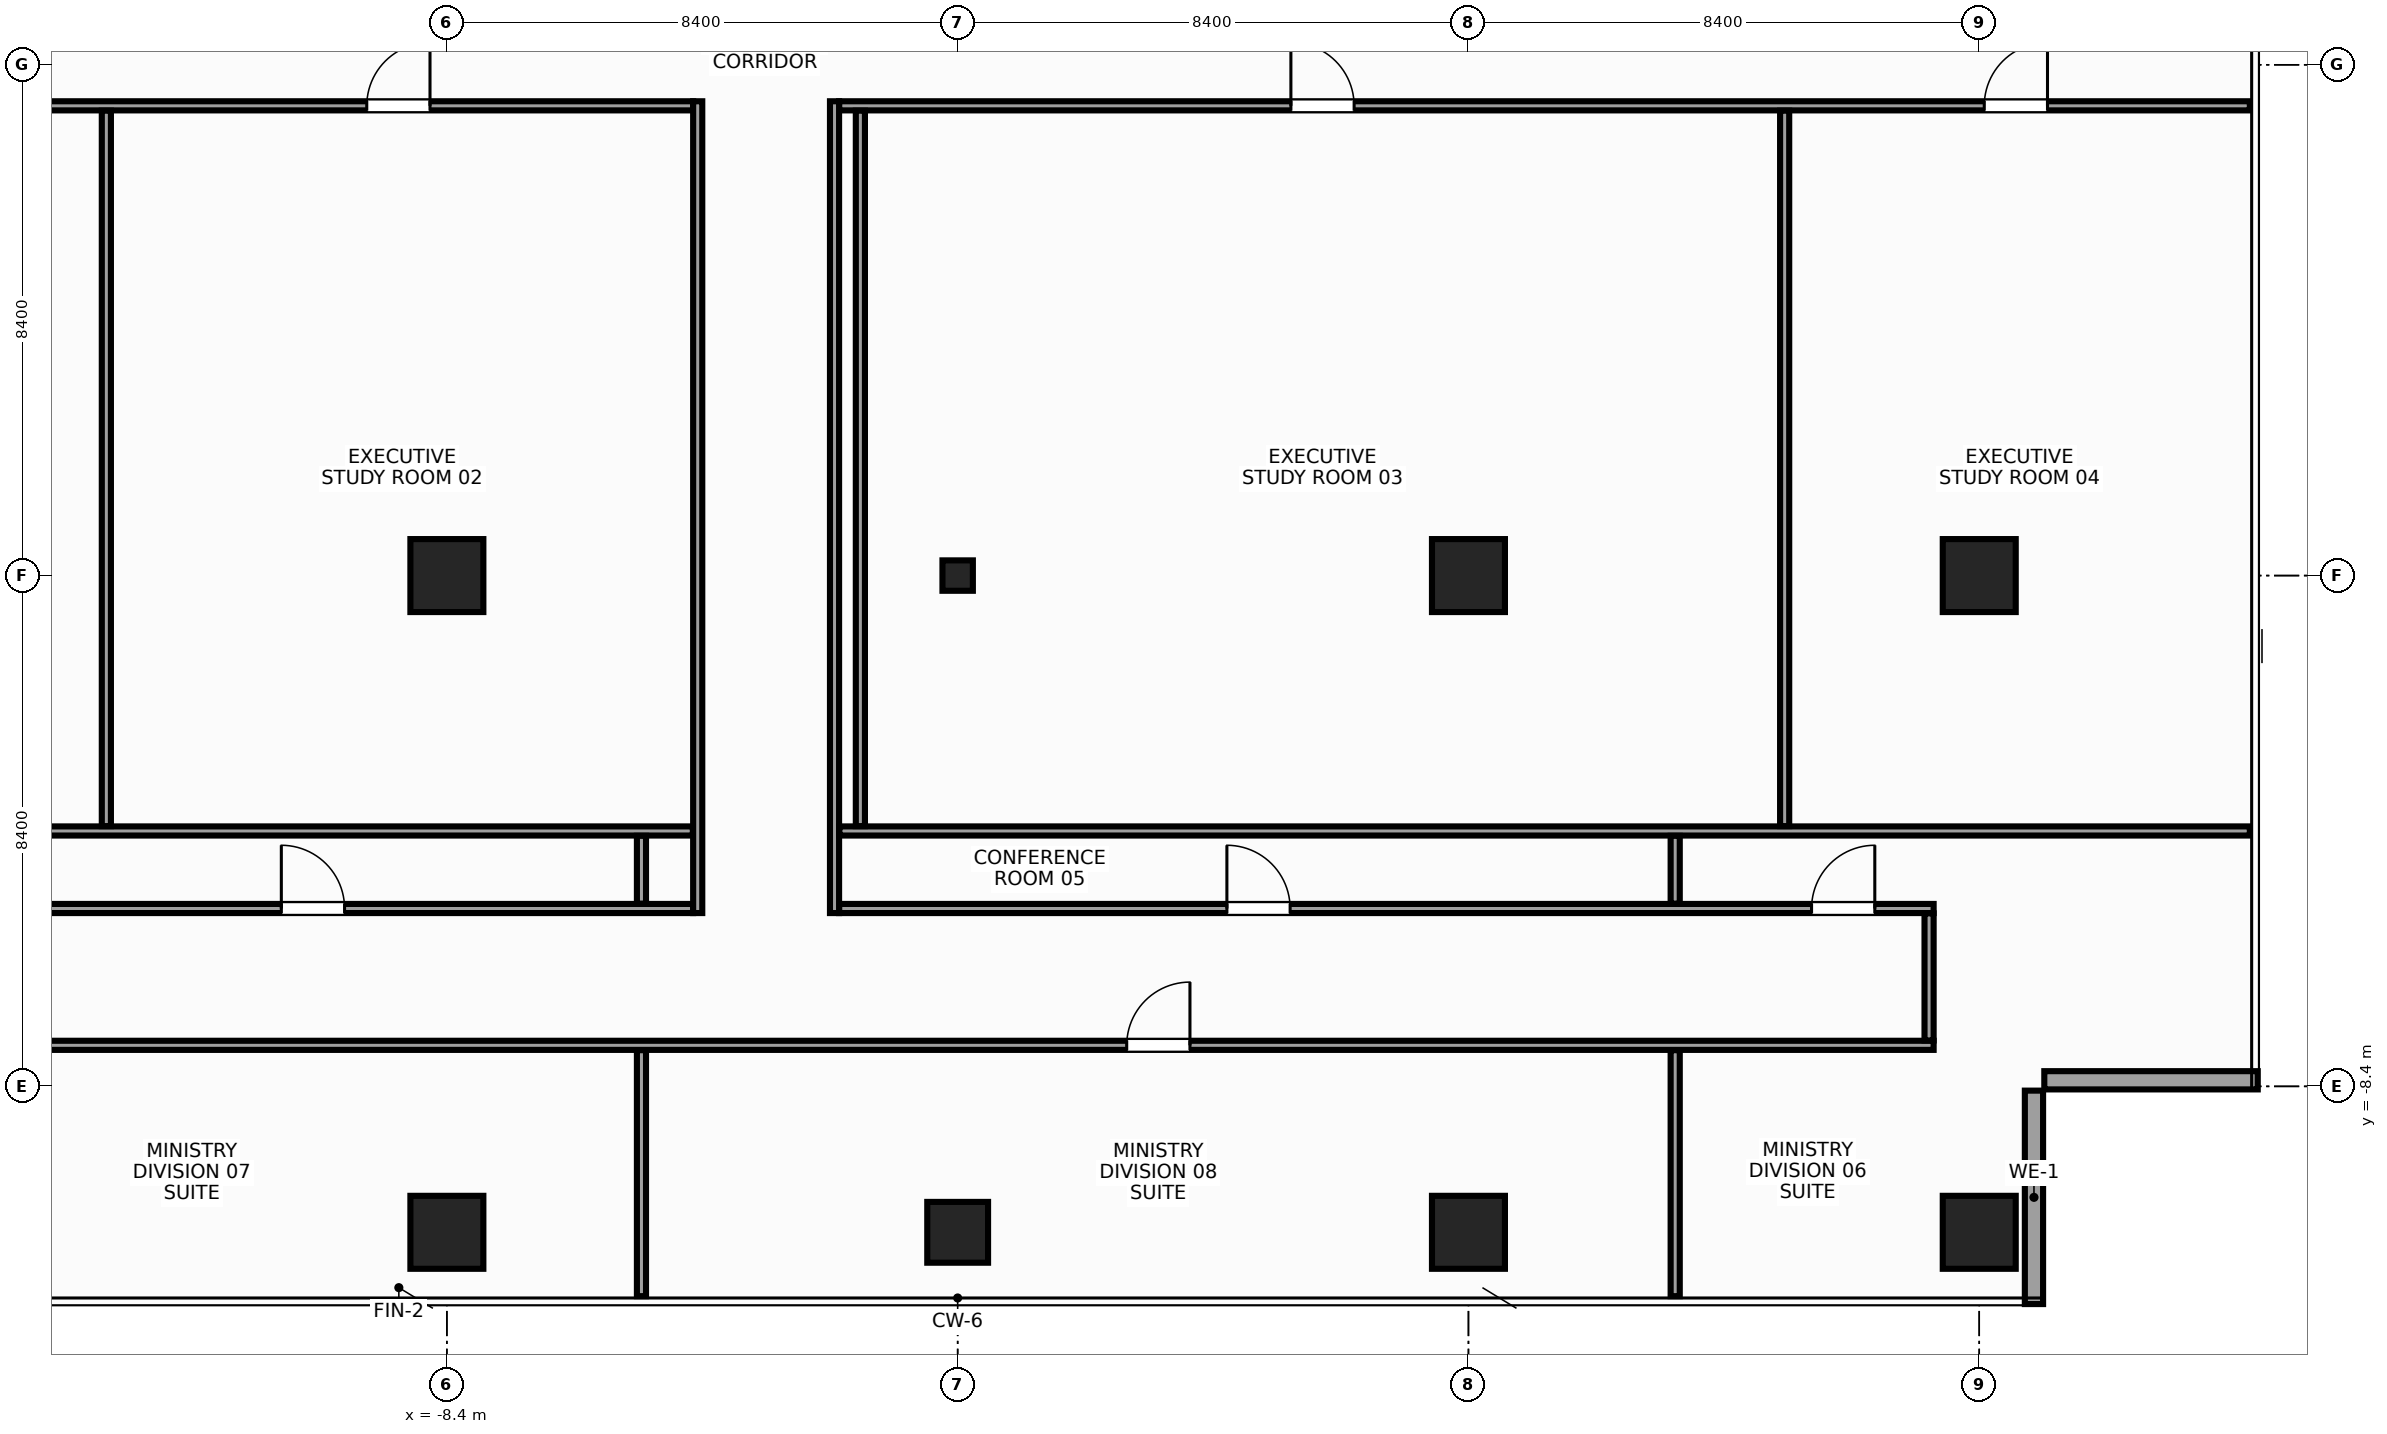
"""IFC4 building model, lengths in metres.
Left out: names, types, materials, properties, quantities, classifications, styles, units other than length and angle.
Written with IfcOpenShell. Run it as: python <this file> out.ifc"""

import sys

from ifc_helpers import new_model, si_unit, direction, frame, frame_2d, origin, origin_with_axes, origin_2d, place, context, subcontext, project, spatial, rectangle, hollow_rectangle, extrude, source, transform, mapped, element, fill, save


model = new_model("IFC4")
c1 = context("Model", 3, precision=1e-05, world=origin(), true_north=direction((0.0, 1.0)))
c2 = subcontext(c1, "Body", "Model", "MODEL_VIEW")
j1 = project(units=[si_unit("LENGTHUNIT", "METRE"), si_unit("PLANEANGLEUNIT", "RADIAN")], contexts=[c1])
p1 = place(None, origin())
s1 = spatial("IfcSite", under=j1, at=p1, CompositionType="ELEMENT")
p2 = place(p1, origin())
s2 = spatial("IfcBuilding", under=s1, at=p2, CompositionType="ELEMENT")
p3 = place(p2, frame((0.0, 0.0, 279.2)))
s3 = spatial("IfcBuildingStorey", under=s2, at=p3, CompositionType="ELEMENT", Elevation=279.2)
m1 = source(origin(), c2, "Body", "SweptSolid", [
    extrude(rectangle(XDim=1.2, YDim=1.2, at=origin_2d()), origin(), (0.0, 0.0, 1.0), 3.6),
])
for number, where, z_axis, x_axis in (
    (1, (16.8, -10.8, 0.0), (0.0, 0.0, 1.0), (1.0, 0.0, 0.0)),
    (2, (16.8, 0.0, 0.0), (0.0, 0.0, 1.0), (1.0, 0.0, 0.0)),
    (3, (-8.4, 0.0, 0.0), (0.0, 0.0, 1.0), (1.0, 0.0, 0.0)),
    (4, (-8.4, -10.8, 0.0), (0.0, 0.0, 1.0), (1.0, 0.0, 0.0)),
    (5, (8.4, 0.0, 0.0), (0.0, 0.0, 1.0), (1.0, 0.0, 0.0)),
    (6, (8.4, -10.8, 0.0), (0.0, 0.0, 1.0), (1.0, 0.0, 0.0)),
):
    element("IfcColumn", number, at=place(p3, frame(where, z_axis=z_axis, x_axis=x_axis)), inside=s3, PredefinedType="COLUMN", context=c2, shape_type="MappedRepresentation", body=[
        mapped(m1, transform((0.0, 0.0, 0.0), x_axis=(1.0, 0.0, 0.0), y_axis=(0.0, 1.0, 0.0), z_axis=(0.0, 0.0, 1.0), scale=1.0)),
    ])
m2 = source(origin(), c2, "Body", "SweptSolid", [
    extrude(rectangle(XDim=1.0, YDim=1.0, at=origin_2d()), origin(), (0.0, 0.0, 1.0), 3.6),
])
p4 = place(p3, frame((0.0, -10.8, 0.0), z_axis=(0.0, 0.0, 1.0), x_axis=(1.0, 0.0, 0.0)))
e7 = element("IfcColumn", 7, at=p4, inside=s3, PredefinedType="COLUMN", context=c2, shape_type="MappedRepresentation", body=[
    mapped(m2, transform((0.0, 0.0, 0.0), x_axis=(1.0, 0.0, 0.0), y_axis=(0.0, 1.0, 0.0), z_axis=(0.0, 0.0, 1.0), scale=1.0)),
])
m3 = source(origin(), c2, "Body", "SweptSolid", [
    extrude(hollow_rectangle(XDim=0.5, YDim=0.5, WallThickness=0.025, at=origin_2d()), origin(), (0.0, 0.0, 1.0), 3.6),
])
p5 = place(p3, origin_with_axes())
e8 = element("IfcColumn", 8, at=p5, inside=s3, PredefinedType="COLUMN", context=c2, shape_type="MappedRepresentation", body=[
    mapped(m3, transform((0.0, 0.0, 0.0), x_axis=(1.0, 0.0, 0.0), y_axis=(0.0, 1.0, 0.0), z_axis=(0.0, 0.0, 1.0), scale=1.0)),
])
m4 = source(origin(), c2, "Body", "SweptSolid", [
    extrude(rectangle(XDim=3.51, YDim=0.3, at=frame_2d((1.755, 0.0))), origin(), (0.0, 0.0, 1.0), 2.75),
])
p6 = place(p3, frame((17.7, -11.98, 0.0), z_axis=(0.0, 0.0, 1.0), x_axis=(0.0, 1.0, 0.0)))
e9 = element("IfcWall", 9, at=p6, inside=s3, PredefinedType="STANDARD", context=c2, shape_type="MappedRepresentation", body=[
    mapped(m4, transform((0.0, 0.0, 0.0), x_axis=(1.0, 0.0, 0.0), y_axis=(0.0, 1.0, 0.0), z_axis=(0.0, 0.0, 1.0), scale=1.0)),
])
m5 = source(origin(), c2, "Body", "SweptSolid", [
    extrude(rectangle(XDim=3.51, YDim=0.3, at=frame_2d((1.755, 0.0))), origin(), (0.0, 0.0, 1.0), 2.75),
])
p7 = place(p3, frame((17.87, -8.3, 0.0), z_axis=(0.0, 0.0, 1.0), x_axis=(1.0, 0.0, 0.0)))
e10 = element("IfcWall", 10, at=p7, inside=s3, PredefinedType="STANDARD", context=c2, shape_type="MappedRepresentation", body=[
    mapped(m5, transform((0.0, 0.0, 0.0), x_axis=(1.0, 0.0, 0.0), y_axis=(0.0, 1.0, 0.0), z_axis=(0.0, 0.0, 1.0), scale=1.0)),
])
m6 = source(origin(), c2, "Body", "SweptSolid", [
    extrude(rectangle(XDim=16.9, YDim=0.15, at=frame_2d((8.45, 0.0))), origin(), (0.0, 0.0, 1.0), 2.755),
])
p8 = place(p3, frame((-21.25, 7.725, 0.0), z_axis=(0.0, 0.0, 1.0), x_axis=(1.0, 0.0, 0.0)))
e11 = element("IfcWall", 11, at=p8, inside=s3, PredefinedType="PARTITIONING", context=c2, shape_type="MappedRepresentation", body=[
    mapped(m6, transform((0.0, 0.0, 0.0), x_axis=(1.0, 0.0, 0.0), y_axis=(0.0, 1.0, 0.0), z_axis=(0.0, 0.0, 1.0), scale=1.0)),
])
p9 = place(p8, frame((3.127, 0.0, 0.0)))
e12 = element("IfcOpeningElement", 12, at=p9, cuts=e11, PredefinedType="OPENING", context=c2, shape_type="SweptSolid", body=[
    extrude(rectangle(XDim=1.04, YDim=2.2, at=frame_2d((0.52, 1.1))), frame((0.0, 0.087, 0.0), z_axis=(0.0, -1.0, 0.0), x_axis=(1.0, 0.0, 0.0)), (0.0, 0.0, 1.0), 0.174),
])
p10 = place(p8, frame((11.532, 0.0, 0.0)))
e13 = element("IfcOpeningElement", 13, at=p10, cuts=e11, PredefinedType="OPENING", context=c2, shape_type="SweptSolid", body=[
    extrude(rectangle(XDim=1.04, YDim=2.2, at=frame_2d((0.52, 1.1))), frame((0.0, 0.087, 0.0), z_axis=(0.0, -1.0, 0.0), x_axis=(1.0, 0.0, 0.0)), (0.0, 0.0, 1.0), 0.174),
])
m7 = source(origin(), c2, "Body", "SweptSolid", [
    extrude(rectangle(XDim=23.2, YDim=0.15, at=frame_2d((11.6, 0.0))), origin(), (0.0, 0.0, 1.0), 2.755),
])
p11 = place(p3, frame((-1.95, 7.725, 0.0), z_axis=(0.0, 0.0, 1.0), x_axis=(1.0, 0.0, 0.0)))
e14 = element("IfcWall", 14, at=p11, inside=s3, PredefinedType="PARTITIONING", context=c2, shape_type="MappedRepresentation", body=[
    mapped(m7, transform((0.0, 0.0, 0.0), x_axis=(1.0, 0.0, 0.0), y_axis=(0.0, 1.0, 0.0), z_axis=(0.0, 0.0, 1.0), scale=1.0)),
])
p12 = place(p11, frame((7.43, 0.0, 0.0)))
e15 = element("IfcOpeningElement", 15, at=p12, cuts=e14, PredefinedType="OPENING", context=c2, shape_type="SweptSolid", body=[
    extrude(rectangle(XDim=1.04, YDim=2.2, at=frame_2d((0.52, 1.1))), frame((0.0, 0.087, 0.0), z_axis=(0.0, -1.0, 0.0), x_axis=(1.0, 0.0, 0.0)), (0.0, 0.0, 1.0), 0.174),
])
p13 = place(p11, frame((18.833, 0.0, 0.0)))
e16 = element("IfcOpeningElement", 16, at=p13, cuts=e14, PredefinedType="OPENING", context=c2, shape_type="SweptSolid", body=[
    extrude(rectangle(XDim=1.04, YDim=2.2, at=frame_2d((0.52, 1.1))), frame((0.0, 0.087, 0.0), z_axis=(0.0, -1.0, 0.0), x_axis=(1.0, 0.0, 0.0)), (0.0, 0.0, 1.0), 0.174),
])
m8 = source(origin(), c2, "Body", "SweptSolid", [
    extrude(rectangle(XDim=11.7, YDim=0.15, at=frame_2d((5.85, 0.0))), origin(), (0.0, 0.0, 1.0), 2.755),
])
p14 = place(p3, frame((-16.05, -5.475, 0.0), z_axis=(0.0, 0.0, 1.0), x_axis=(1.0, 0.0, 0.0)))
e17 = element("IfcWall", 17, at=p14, inside=s3, PredefinedType="PARTITIONING", context=c2, shape_type="MappedRepresentation", body=[
    mapped(m8, transform((0.0, 0.0, 0.0), x_axis=(1.0, 0.0, 0.0), y_axis=(0.0, 1.0, 0.0), z_axis=(0.0, 0.0, 1.0), scale=1.0)),
])
p15 = place(p14, frame((4.927, 0.0, 0.0)))
e18 = element("IfcOpeningElement", 18, at=p15, cuts=e17, PredefinedType="OPENING", context=c2, shape_type="SweptSolid", body=[
    extrude(rectangle(XDim=1.04, YDim=2.2, at=frame_2d((0.52, 1.1))), frame((0.0, 0.087, 0.0), z_axis=(0.0, -1.0, 0.0), x_axis=(1.0, 0.0, 0.0)), (0.0, 0.0, 1.0), 0.174),
])
m9 = source(origin(), c2, "Body", "SweptSolid", [
    extrude(rectangle(XDim=18.0, YDim=0.15, at=frame_2d((9.0, 0.0))), origin(), (0.0, 0.0, 1.0), 2.755),
])
p16 = place(p3, frame((-1.95, -5.475, 0.0), z_axis=(0.0, 0.0, 1.0), x_axis=(1.0, 0.0, 0.0)))
e19 = element("IfcWall", 19, at=p16, inside=s3, PredefinedType="PARTITIONING", context=c2, shape_type="MappedRepresentation", body=[
    mapped(m9, transform((0.0, 0.0, 0.0), x_axis=(1.0, 0.0, 0.0), y_axis=(0.0, 1.0, 0.0), z_axis=(0.0, 0.0, 1.0), scale=1.0)),
])
p17 = place(p16, frame((6.377, 0.0, 0.0)))
e20 = element("IfcOpeningElement", 20, at=p17, cuts=e19, PredefinedType="OPENING", context=c2, shape_type="SweptSolid", body=[
    extrude(rectangle(XDim=1.04, YDim=2.2, at=frame_2d((0.52, 1.1))), frame((0.0, 0.087, 0.0), z_axis=(0.0, -1.0, 0.0), x_axis=(1.0, 0.0, 0.0)), (0.0, 0.0, 1.0), 0.174),
])
p18 = place(p16, frame((15.992, 0.0, 0.0)))
e21 = element("IfcOpeningElement", 21, at=p18, cuts=e19, PredefinedType="OPENING", context=c2, shape_type="SweptSolid", body=[
    extrude(rectangle(XDim=1.04, YDim=2.2, at=frame_2d((0.52, 1.1))), frame((0.0, 0.087, 0.0), z_axis=(0.0, -1.0, 0.0), x_axis=(1.0, 0.0, 0.0)), (0.0, 0.0, 1.0), 0.174),
])
m10 = source(origin(), c2, "Body", "SweptSolid", [
    extrude(rectangle(XDim=32.1, YDim=0.15, at=frame_2d((16.05, 0.0))), origin(), (0.0, 0.0, 1.0), 2.755),
])
p19 = place(p3, frame((-16.05, -7.725, 0.0), z_axis=(0.0, 0.0, 1.0), x_axis=(1.0, 0.0, 0.0)))
e22 = element("IfcWall", 22, at=p19, inside=s3, PredefinedType="PARTITIONING", context=c2, shape_type="MappedRepresentation", body=[
    mapped(m10, transform((0.0, 0.0, 0.0), x_axis=(1.0, 0.0, 0.0), y_axis=(0.0, 1.0, 0.0), z_axis=(0.0, 0.0, 1.0), scale=1.0)),
])
p20 = place(p19, frame((18.83, 0.0, 0.0)))
e23 = element("IfcOpeningElement", 23, at=p20, cuts=e22, PredefinedType="OPENING", context=c2, shape_type="SweptSolid", body=[
    extrude(rectangle(XDim=1.04, YDim=2.2, at=frame_2d((0.52, 1.1))), frame((0.0, 0.087, 0.0), z_axis=(0.0, -1.0, 0.0), x_axis=(1.0, 0.0, 0.0)), (0.0, 0.0, 1.0), 0.174),
])
m11 = source(origin(), c2, "Body", "SweptSolid", [
    extrude(rectangle(XDim=13.35, YDim=0.15, at=frame_2d((6.675, 0.0))), origin(), (0.0, 0.0, 1.0), 2.655),
])
for number, where, z_axis, x_axis in (
    (24, (-4.275, -5.55, 0.0), (0.0, 0.0, 1.0), (0.0, 1.0, 0.0)),
    (25, (-2.025, -5.55, 0.0), (0.0, 0.0, 1.0), (0.0, 1.0, 0.0)),
):
    element("IfcWall", number, at=place(p3, frame(where, z_axis=z_axis, x_axis=x_axis)), inside=s3, PredefinedType="PARTITIONING", context=c2, shape_type="MappedRepresentation", body=[
        mapped(m11, transform((0.0, 0.0, 0.0), x_axis=(1.0, 0.0, 0.0), y_axis=(0.0, 1.0, 0.0), z_axis=(0.0, 0.0, 1.0), scale=1.0)),
    ])
m12 = source(origin(), c2, "Body", "SweptSolid", [
    extrude(rectangle(XDim=2.09, YDim=0.15, at=frame_2d((1.045, 0.0))), origin(), (0.0, 0.0, 1.0), 3.37),
])
p21 = place(p3, frame((15.975, -7.645, 0.0), z_axis=(0.0, 0.0, 1.0), x_axis=(0.0, 1.0, 0.0)))
e26 = element("IfcWall", 26, at=p21, inside=s3, PredefinedType="PARTITIONING", context=c2, shape_type="MappedRepresentation", body=[
    mapped(m12, transform((0.0, 0.0, 0.0), x_axis=(1.0, 0.0, 0.0), y_axis=(0.0, 1.0, 0.0), z_axis=(0.0, 0.0, 1.0), scale=1.0)),
])
m13 = source(origin(), c2, "Body", "SweptSolid", [
    extrude(rectangle(XDim=16.895, YDim=0.15, at=frame_2d((8.448, 0.0))), origin(), (0.0, 0.0, 1.0), 2.755),
])
p22 = place(p3, frame((-21.25, -4.2, 0.0), z_axis=(0.0, 0.0, 1.0), x_axis=(1.0, 0.0, 0.0)))
e27 = element("IfcWall", 27, at=p22, inside=s3, PredefinedType="PARTITIONING", context=c2, shape_type="MappedRepresentation", body=[
    mapped(m13, transform((0.0, 0.0, 0.0), x_axis=(1.0, 0.0, 0.0), y_axis=(0.0, 1.0, 0.0), z_axis=(0.0, 0.0, 1.0), scale=1.0)),
])
m14 = source(origin(), c2, "Body", "SweptSolid", [
    extrude(rectangle(XDim=23.195, YDim=0.15, at=frame_2d((11.598, 0.0))), origin(), (0.0, 0.0, 1.0), 2.755),
])
p23 = place(p3, frame((-1.945, -4.2, 0.0), z_axis=(0.0, 0.0, 1.0), x_axis=(1.0, 0.0, 0.0)))
e28 = element("IfcWall", 28, at=p23, inside=s3, PredefinedType="PARTITIONING", context=c2, shape_type="MappedRepresentation", body=[
    mapped(m14, transform((0.0, 0.0, 0.0), x_axis=(1.0, 0.0, 0.0), y_axis=(0.0, 1.0, 0.0), z_axis=(0.0, 0.0, 1.0), scale=1.0)),
])
m15 = source(origin(), c2, "Body", "SweptSolid", [
    extrude(rectangle(XDim=11.765, YDim=0.15, at=frame_2d((5.883, 0.0))), origin(), (0.0, 0.0, 1.0), 2.655),
])
for number, where, z_axis, x_axis in (
    (29, (-14.0, -4.12, 0.0), (0.0, 0.0, 1.0), (0.0, 1.0, 0.0)),
    (30, (-1.6, -4.12, 0.0), (0.0, 0.0, 1.0), (0.0, 1.0, 0.0)),
    (31, (13.6, -4.12, 0.0), (0.0, 0.0, 1.0), (0.0, 1.0, 0.0)),
):
    element("IfcWall", number, at=place(p3, frame(where, z_axis=z_axis, x_axis=x_axis)), inside=s3, PredefinedType="PARTITIONING", context=c2, shape_type="MappedRepresentation", body=[
        mapped(m15, transform((0.0, 0.0, 0.0), x_axis=(1.0, 0.0, 0.0), y_axis=(0.0, 1.0, 0.0), z_axis=(0.0, 0.0, 1.0), scale=1.0)),
    ])
m16 = source(origin(), c2, "Body", "SweptSolid", [
    extrude(rectangle(XDim=4.045, YDim=0.15, at=frame_2d((2.022, 0.0))), origin(), (0.0, 0.0, 1.0), 2.905),
])
p24 = place(p3, frame((-5.2, -11.85, 0.0), z_axis=(0.0, 0.0, 1.0), x_axis=(0.0, 1.0, 0.0)))
e32 = element("IfcWall", 32, at=p24, inside=s3, PredefinedType="PARTITIONING", context=c2, shape_type="MappedRepresentation", body=[
    mapped(m16, transform((0.0, 0.0, 0.0), x_axis=(1.0, 0.0, 0.0), y_axis=(0.0, 1.0, 0.0), z_axis=(0.0, 0.0, 1.0), scale=1.0)),
])
m17 = source(origin(), c2, "Body", "SweptSolid", [
    extrude(rectangle(XDim=1.115, YDim=0.15, at=frame_2d((0.558, 0.0))), origin(), (0.0, 0.0, 1.0), 3.37),
])
p25 = place(p3, frame((-5.2, -5.395, 0.0), z_axis=(0.0, 0.0, 1.0), x_axis=(0.0, 1.0, 0.0)))
e33 = element("IfcWall", 33, at=p25, inside=s3, PredefinedType="PARTITIONING", context=c2, shape_type="MappedRepresentation", body=[
    mapped(m17, transform((0.0, 0.0, 0.0), x_axis=(1.0, 0.0, 0.0), y_axis=(0.0, 1.0, 0.0), z_axis=(0.0, 0.0, 1.0), scale=1.0)),
])
p26 = place(p3, frame((11.8, -11.85, 0.0), z_axis=(0.0, 0.0, 1.0), x_axis=(0.0, 1.0, 0.0)))
e34 = element("IfcWall", 34, at=p26, inside=s3, PredefinedType="PARTITIONING", context=c2, shape_type="MappedRepresentation", body=[
    mapped(m16, transform((0.0, 0.0, 0.0), x_axis=(1.0, 0.0, 0.0), y_axis=(0.0, 1.0, 0.0), z_axis=(0.0, 0.0, 1.0), scale=1.0)),
])
p27 = place(p3, frame((11.8, -5.395, 0.0), z_axis=(0.0, 0.0, 1.0), x_axis=(0.0, 1.0, 0.0)))
e35 = element("IfcWall", 35, at=p27, inside=s3, PredefinedType="PARTITIONING", context=c2, shape_type="MappedRepresentation", body=[
    mapped(m17, transform((0.0, 0.0, 0.0), x_axis=(1.0, 0.0, 0.0), y_axis=(0.0, 1.0, 0.0), z_axis=(0.0, 0.0, 1.0), scale=1.0)),
])
m18 = source(origin(), c2, "Body", "SweptSolid", [
    extrude(rectangle(XDim=1.04, YDim=2.2, at=frame_2d((0.52, 1.1))), frame((0.0, 0.025, 0.0), z_axis=(0.0, -1.0, 0.0), x_axis=(1.0, 0.0, 0.0)), (0.0, 0.0, 1.0), 0.05),
])
p28 = place(p10, origin())
e36 = element("IfcDoor", 36, at=p28, inside=s3, OperationType="SINGLE_SWING_RIGHT", PredefinedType="DOOR", context=c2, shape_type="MappedRepresentation", body=[
    mapped(m18, transform((0.0, 0.0, 0.0), x_axis=(1.0, 0.0, 0.0), y_axis=(0.0, 1.0, 0.0), z_axis=(0.0, 0.0, 1.0), scale=1.0)),
])
fill(e13, e36)
p29 = place(p12, origin())
e37 = element("IfcDoor", 37, at=p29, inside=s3, OperationType="SINGLE_SWING_LEFT", PredefinedType="DOOR", context=c2, shape_type="MappedRepresentation", body=[
    mapped(m18, transform((0.0, 0.0, 0.0), x_axis=(1.0, 0.0, 0.0), y_axis=(0.0, 1.0, 0.0), z_axis=(0.0, 0.0, 1.0), scale=1.0)),
])
fill(e15, e37)
p30 = place(p13, origin())
e38 = element("IfcDoor", 38, at=p30, inside=s3, OperationType="SINGLE_SWING_RIGHT", PredefinedType="DOOR", context=c2, shape_type="MappedRepresentation", body=[
    mapped(m18, transform((0.0, 0.0, 0.0), x_axis=(1.0, 0.0, 0.0), y_axis=(0.0, 1.0, 0.0), z_axis=(0.0, 0.0, 1.0), scale=1.0)),
])
fill(e16, e38)
p31 = place(p17, origin())
e39 = element("IfcDoor", 39, at=p31, inside=s3, OperationType="SINGLE_SWING_LEFT", PredefinedType="DOOR", context=c2, shape_type="MappedRepresentation", body=[
    mapped(m18, transform((0.0, 0.0, 0.0), x_axis=(1.0, 0.0, 0.0), y_axis=(0.0, 1.0, 0.0), z_axis=(0.0, 0.0, 1.0), scale=1.0)),
])
fill(e20, e39)
p32 = place(p18, origin())
e40 = element("IfcDoor", 40, at=p32, inside=s3, OperationType="SINGLE_SWING_RIGHT", PredefinedType="DOOR", context=c2, shape_type="MappedRepresentation", body=[
    mapped(m18, transform((0.0, 0.0, 0.0), x_axis=(1.0, 0.0, 0.0), y_axis=(0.0, 1.0, 0.0), z_axis=(0.0, 0.0, 1.0), scale=1.0)),
])
fill(e21, e40)
p33 = place(p15, origin())
e41 = element("IfcDoor", 41, at=p33, inside=s3, OperationType="SINGLE_SWING_LEFT", PredefinedType="DOOR", context=c2, shape_type="MappedRepresentation", body=[
    mapped(m18, transform((0.0, 0.0, 0.0), x_axis=(1.0, 0.0, 0.0), y_axis=(0.0, 1.0, 0.0), z_axis=(0.0, 0.0, 1.0), scale=1.0)),
])
fill(e18, e41)
p34 = place(p20, origin())
e42 = element("IfcDoor", 42, at=p34, inside=s3, OperationType="SINGLE_SWING_RIGHT", PredefinedType="DOOR", context=c2, shape_type="MappedRepresentation", body=[
    mapped(m18, transform((0.0, 0.0, 0.0), x_axis=(1.0, 0.0, 0.0), y_axis=(0.0, 1.0, 0.0), z_axis=(0.0, 0.0, 1.0), scale=1.0)),
])
fill(e23, e42)
save(model, sys.argv[1])
